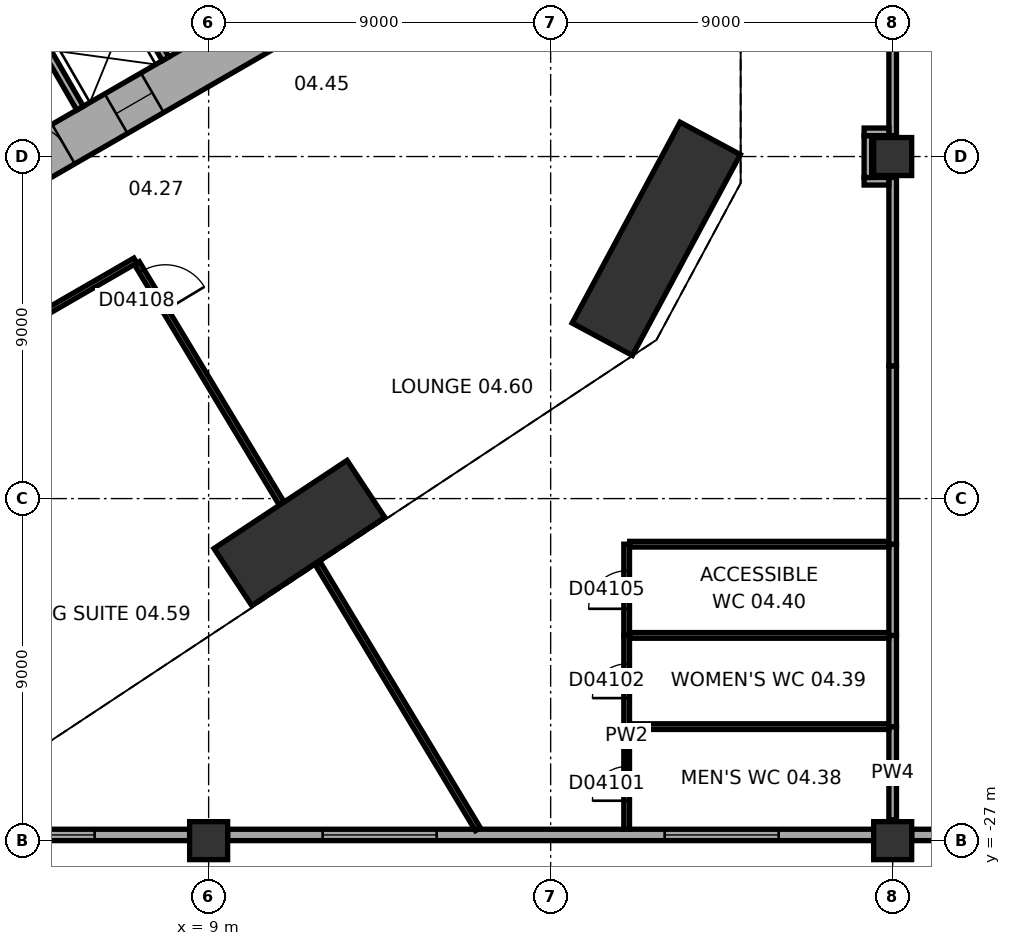
"""IFC4 building model, lengths in metres.
Left out: names, types, materials, properties, quantities, classifications, styles, units other than length and angle.
Written with IfcOpenShell. Run it as: python <this file> out.ifc"""

import sys

from ifc_helpers import new_model, si_unit, direction, frame, frame_2d, origin, origin_2d, place, context, subcontext, project, spatial, rectangle, extrude, element, fill, save


model = new_model("IFC4")
c1 = context("Model", 3, precision=1e-05, world=origin(), true_north=direction((0.0, 1.0)))
c2 = subcontext(c1, "Body", "Model", "MODEL_VIEW")
j1 = project(units=[si_unit("LENGTHUNIT", "METRE"), si_unit("PLANEANGLEUNIT", "RADIAN")], contexts=[c1])
p1 = place(None, origin())
s1 = spatial("IfcSite", under=j1, at=p1, CompositionType="ELEMENT")
p2 = place(p1, origin())
s2 = spatial("IfcBuilding", under=s1, at=p2, CompositionType="ELEMENT")
p3 = place(p2, frame((0.0, 0.0, 29.0)))
s3 = spatial("IfcBuildingStorey", under=s2, at=p3, CompositionType="ELEMENT", Elevation=29.0)
p4 = place(p3, frame((11.389, -18.905, 0.0), z_axis=(0.0, 0.0, 1.0), x_axis=(0.833880042151, 0.551945717714, 0.0)))
e1 = element("IfcColumn", 1, at=p4, inside=s3, PredefinedType="COLUMN", context=c2, shape_type="SweptSolid", body=[
    extrude(rectangle(XDim=4.2, YDim=1.8, at=origin_2d()), origin(), (0.0, 0.0, 1.0), 5.5),
])
p5 = place(p3, frame((20.779, -11.165, 0.0), z_axis=(0.0, 0.0, 1.0), x_axis=(0.473322742071, 0.880889086003, 0.0)))
e2 = element("IfcColumn", 2, at=p5, inside=s3, PredefinedType="COLUMN", context=c2, shape_type="SweptSolid", body=[
    extrude(rectangle(XDim=6.0, YDim=1.8, at=origin_2d()), origin(), (0.0, 0.0, 1.0), 5.5),
])
for number, where, z_axis, x_axis in (
    (3, (9.0, -27.0, 0.0), (0.0, 0.0, 1.0), (1.0, 0.0, 0.0)),
    (4, (27.0, -27.0, 0.0), (0.0, 0.0, 1.0), (1.0, 0.0, 0.0)),
    (5, (27.0, -9.0, 0.0), (0.0, 0.0, 1.0), (1.0, 0.0, 0.0)),
):
    element("IfcColumn", number, at=place(p3, frame(where, z_axis=z_axis, x_axis=x_axis)), inside=s3, PredefinedType="COLUMN", context=c2, shape_type="SweptSolid", body=[
        extrude(rectangle(XDim=1.0, YDim=1.0, at=origin_2d()), origin(), (0.0, 0.0, 1.0), 5.5),
    ])
p6 = place(p3, frame((-0.3, -11.836, 0.0), z_axis=(0.0, 0.0, 1.0), x_axis=(0.866021384402, 0.500006961711, 0.0)))
e6 = element("IfcWall", 6, at=p6, inside=s3, PredefinedType="SHEAR", context=c2, shape_type="SweptSolid", body=[
    extrude(rectangle(XDim=12.355, YDim=1.2, at=frame_2d((6.178, 0.0))), origin(), (0.0, 0.0, 1.0), 5.5),
])
p7 = place(p6, frame((2.828, 0.0, 0.0)))
e7 = element("IfcOpeningElement", 7, at=p7, cuts=e6, PredefinedType="OPENING", context=c2, shape_type="SweptSolid", body=[
    extrude(rectangle(XDim=0.9, YDim=2.1, at=frame_2d((0.45, 1.05))), frame((0.0, 0.61, 0.0), z_axis=(0.0, -1.0, 0.0), x_axis=(1.0, 0.0, 0.0)), (0.0, 0.0, 1.0), 1.22),
])
p8 = place(p6, frame((5.428, 0.0, 0.0)))
e8 = element("IfcOpeningElement", 8, at=p8, cuts=e6, PredefinedType="OPENING", context=c2, shape_type="SweptSolid", body=[
    extrude(rectangle(XDim=0.9, YDim=2.1, at=frame_2d((0.45, 1.05))), frame((0.0, 0.61, 0.0), z_axis=(0.0, -1.0, 0.0), x_axis=(1.0, 0.0, 0.0)), (0.0, 0.0, 1.0), 1.22),
])
p9 = place(p6, frame((7.928, 0.0, 0.0)))
e9 = element("IfcOpeningElement", 9, at=p9, cuts=e6, PredefinedType="OPENING", context=c2, shape_type="SweptSolid", body=[
    extrude(rectangle(XDim=1.1, YDim=2.1, at=frame_2d((0.55, 1.05))), frame((0.0, 0.61, 0.0), z_axis=(0.0, -1.0, 0.0), x_axis=(1.0, 0.0, 0.0)), (0.0, 0.0, 1.0), 1.22),
])
p10 = place(p3, frame((-8.5, -26.85, 0.0), z_axis=(0.0, 0.0, 1.0), x_axis=(1.0, 0.0, 0.0)))
e10 = element("IfcWall", 10, at=p10, inside=s3, PredefinedType="STANDARD", context=c2, shape_type="SweptSolid", body=[
    extrude(rectangle(XDim=17.0, YDim=0.3, at=frame_2d((8.5, 0.0))), origin(), (0.0, 0.0, 1.0), 3.95),
])
p11 = place(p10, frame((2.5, 0.0, 1.0)))
e11 = element("IfcOpeningElement", 11, at=p11, cuts=e10, PredefinedType="OPENING", context=c2, shape_type="SweptSolid", body=[
    extrude(rectangle(XDim=3.0, YDim=2.6, at=frame_2d((1.5, 1.3))), frame((0.0, 0.16, 0.0), z_axis=(0.0, -1.0, 0.0), x_axis=(1.0, 0.0, 0.0)), (0.0, 0.0, 1.0), 0.32),
])
p12 = place(p10, frame((11.5, 0.0, 1.0)))
e12 = element("IfcOpeningElement", 12, at=p12, cuts=e10, PredefinedType="OPENING", context=c2, shape_type="SweptSolid", body=[
    extrude(rectangle(XDim=3.0, YDim=2.6, at=frame_2d((1.5, 1.3))), frame((0.0, 0.16, 0.0), z_axis=(0.0, -1.0, 0.0), x_axis=(1.0, 0.0, 0.0)), (0.0, 0.0, 1.0), 0.32),
])
p13 = place(p3, frame((9.5, -26.85, 0.0), z_axis=(0.0, 0.0, 1.0), x_axis=(1.0, 0.0, 0.0)))
e13 = element("IfcWall", 13, at=p13, inside=s3, PredefinedType="STANDARD", context=c2, shape_type="SweptSolid", body=[
    extrude(rectangle(XDim=17.0, YDim=0.3, at=frame_2d((8.5, 0.0))), origin(), (0.0, 0.0, 1.0), 3.95),
])
p14 = place(p13, frame((2.5, 0.0, 1.0)))
e14 = element("IfcOpeningElement", 14, at=p14, cuts=e13, PredefinedType="OPENING", context=c2, shape_type="SweptSolid", body=[
    extrude(rectangle(XDim=3.0, YDim=2.6, at=frame_2d((1.5, 1.3))), frame((0.0, 0.16, 0.0), z_axis=(0.0, -1.0, 0.0), x_axis=(1.0, 0.0, 0.0)), (0.0, 0.0, 1.0), 0.32),
])
p15 = place(p13, frame((11.5, 0.0, 1.0)))
e15 = element("IfcOpeningElement", 15, at=p15, cuts=e13, PredefinedType="OPENING", context=c2, shape_type="SweptSolid", body=[
    extrude(rectangle(XDim=3.0, YDim=2.6, at=frame_2d((1.5, 1.3))), frame((0.0, 0.16, 0.0), z_axis=(0.0, -1.0, 0.0), x_axis=(1.0, 0.0, 0.0)), (0.0, 0.0, 1.0), 0.32),
])
p16 = place(p3, frame((27.5, -26.85, 0.0), z_axis=(0.0, 0.0, 1.0), x_axis=(1.0, 0.0, 0.0)))
e16 = element("IfcWall", 16, at=p16, inside=s3, PredefinedType="STANDARD", context=c2, shape_type="SweptSolid", body=[
    extrude(rectangle(XDim=17.0, YDim=0.3, at=frame_2d((8.5, 0.0))), origin(), (0.0, 0.0, 1.0), 3.95),
])
p17 = place(p16, frame((2.5, 0.0, 1.0)))
e17 = element("IfcOpeningElement", 17, at=p17, cuts=e16, PredefinedType="OPENING", context=c2, shape_type="SweptSolid", body=[
    extrude(rectangle(XDim=3.0, YDim=2.6, at=frame_2d((1.5, 1.3))), frame((0.0, 0.16, 0.0), z_axis=(0.0, -1.0, 0.0), x_axis=(1.0, 0.0, 0.0)), (0.0, 0.0, 1.0), 0.32),
])
p18 = place(p16, frame((11.5, 0.0, 1.0)))
e18 = element("IfcOpeningElement", 18, at=p18, cuts=e16, PredefinedType="OPENING", context=c2, shape_type="SweptSolid", body=[
    extrude(rectangle(XDim=3.0, YDim=2.6, at=frame_2d((1.5, 1.3))), frame((0.0, 0.16, 0.0), z_axis=(0.0, -1.0, 0.0), x_axis=(1.0, 0.0, 0.0)), (0.0, 0.0, 1.0), 0.32),
])
p19 = place(p3, frame((-0.024, -8.559, 0.0), z_axis=(0.0, 0.0, 1.0), x_axis=(0.866026010844, 0.49999894854, 0.0)))
e19 = element("IfcWall", 19, at=p19, inside=s3, PredefinedType="PARTITIONING", context=c2, shape_type="SweptSolid", body=[
    extrude(rectangle(XDim=8.0, YDim=0.2, at=frame_2d((4.0, 0.0))), origin(), (0.0, 0.0, 1.0), 5.15),
])
for number, where, z_axis, x_axis in (
    (20, (4.516, -5.822, 0.0), (0.0, 0.0, 1.0), (0.5, -0.866, 0.0)),
    (21, (6.768, -4.522, 0.0), (0.0, 0.0, 1.0), (0.5, -0.866, 0.0)),
):
    element("IfcWall", number, at=place(p3, frame(where, z_axis=z_axis, x_axis=x_axis)), inside=s3, PredefinedType="PARTITIONING", context=c2, shape_type="SweptSolid", body=[
        extrude(rectangle(XDim=2.2, YDim=0.2, at=frame_2d((1.1, 0.0))), origin(), (0.0, 0.0, 1.0), 5.15),
    ])
p20 = place(p3, frame((0.847, -7.767, 0.0), z_axis=(0.0, 0.0, 1.0), x_axis=(0.866027801685, 0.499995846692, 0.0)))
e22 = element("IfcWall", 22, at=p20, inside=s3, PredefinedType="SHEAR", context=c2, shape_type="SweptSolid", body=[
    extrude(rectangle(XDim=7.06, YDim=0.3, at=frame_2d((3.53, 0.0))), origin(), (0.0, 0.0, 1.0), 5.15),
])
p21 = place(p3, frame((20.0, -26.7, 0.0), z_axis=(0.0, 0.0, 1.0), x_axis=(0.0, 1.0, 0.0)))
e23 = element("IfcWall", 23, at=p21, inside=s3, PredefinedType="PARTITIONING", context=c2, shape_type="SweptSolid", body=[
    extrude(rectangle(XDim=2.7, YDim=0.15, at=frame_2d((1.35, 0.0))), origin(), (0.0, 0.0, 1.0), 5.15),
])
p22 = place(p21, frame((0.75, 0.0, 0.0)))
e24 = element("IfcOpeningElement", 24, at=p22, cuts=e23, PredefinedType="OPENING", context=c2, shape_type="SweptSolid", body=[
    extrude(rectangle(XDim=0.9, YDim=2.1, at=frame_2d((0.45, 1.05))), frame((0.0, 0.085, 0.0), z_axis=(0.0, -1.0, 0.0), x_axis=(1.0, 0.0, 0.0)), (0.0, 0.0, 1.0), 0.17),
])
p23 = place(p3, frame((27.0, -26.45, 0.0), z_axis=(0.0, 0.0, 1.0), x_axis=(0.0, 1.0, 0.0)))
e25 = element("IfcWall", 25, at=p23, inside=s3, PredefinedType="PARTITIONING", context=c2, shape_type="SweptSolid", body=[
    extrude(rectangle(XDim=2.45, YDim=0.2, at=frame_2d((1.225, 0.0))), origin(), (0.0, 0.0, 1.0), 3.95),
])
p24 = place(p3, frame((20.0, -24.0, 0.0), z_axis=(0.0, 0.0, 1.0), x_axis=(0.0, 1.0, 0.0)))
e26 = element("IfcWall", 26, at=p24, inside=s3, PredefinedType="PARTITIONING", context=c2, shape_type="SweptSolid", body=[
    extrude(rectangle(XDim=2.4, YDim=0.15, at=frame_2d((1.2, 0.0))), origin(), (0.0, 0.0, 1.0), 5.15),
])
p25 = place(p24, frame((0.75, 0.0, 0.0)))
e27 = element("IfcOpeningElement", 27, at=p25, cuts=e26, PredefinedType="OPENING", context=c2, shape_type="SweptSolid", body=[
    extrude(rectangle(XDim=0.9, YDim=2.1, at=frame_2d((0.45, 1.05))), frame((0.0, 0.085, 0.0), z_axis=(0.0, -1.0, 0.0), x_axis=(1.0, 0.0, 0.0)), (0.0, 0.0, 1.0), 0.17),
])
p26 = place(p3, frame((20.08, -24.0, 0.0), z_axis=(0.0, 0.0, 1.0), x_axis=(1.0, 0.0, 0.0)))
e28 = element("IfcWall", 28, at=p26, inside=s3, PredefinedType="PARTITIONING", context=c2, shape_type="SweptSolid", body=[
    extrude(rectangle(XDim=6.82, YDim=0.15, at=frame_2d((3.41, 0.0))), origin(), (0.0, 0.0, 1.0), 5.15),
])
p27 = place(p3, frame((27.0, -24.0, 0.0), z_axis=(0.0, 0.0, 1.0), x_axis=(0.0, 1.0, 0.0)))
e29 = element("IfcWall", 29, at=p27, inside=s3, PredefinedType="PARTITIONING", context=c2, shape_type="SweptSolid", body=[
    extrude(rectangle(XDim=2.4, YDim=0.2, at=frame_2d((1.2, 0.0))), origin(), (0.0, 0.0, 1.0), 3.95),
])
p28 = place(p3, frame((20.0, -21.6, 0.0), z_axis=(0.0, 0.0, 1.0), x_axis=(0.0, 1.0, 0.0)))
e30 = element("IfcWall", 30, at=p28, inside=s3, PredefinedType="PARTITIONING", context=c2, shape_type="SweptSolid", body=[
    extrude(rectangle(XDim=2.4, YDim=0.15, at=frame_2d((1.2, 0.0))), origin(), (0.0, 0.0, 1.0), 5.15),
])
p29 = place(p28, frame((0.7, 0.0, 0.0)))
e31 = element("IfcOpeningElement", 31, at=p29, cuts=e30, PredefinedType="OPENING", context=c2, shape_type="SweptSolid", body=[
    extrude(rectangle(XDim=1.0, YDim=2.1, at=frame_2d((0.5, 1.05))), frame((0.0, 0.085, 0.0), z_axis=(0.0, -1.0, 0.0), x_axis=(1.0, 0.0, 0.0)), (0.0, 0.0, 1.0), 0.17),
])
p30 = place(p3, frame((20.08, -21.6, 0.0), z_axis=(0.0, 0.0, 1.0), x_axis=(1.0, 0.0, 0.0)))
e32 = element("IfcWall", 32, at=p30, inside=s3, PredefinedType="PARTITIONING", context=c2, shape_type="SweptSolid", body=[
    extrude(rectangle(XDim=6.82, YDim=0.15, at=frame_2d((3.41, 0.0))), origin(), (0.0, 0.0, 1.0), 5.15),
])
p31 = place(p3, frame((27.0, -21.6, 0.0), z_axis=(0.0, 0.0, 1.0), x_axis=(0.0, 1.0, 0.0)))
e33 = element("IfcWall", 33, at=p31, inside=s3, PredefinedType="PARTITIONING", context=c2, shape_type="SweptSolid", body=[
    extrude(rectangle(XDim=2.4, YDim=0.2, at=frame_2d((1.2, 0.0))), origin(), (0.0, 0.0, 1.0), 3.95),
])
p32 = place(p3, frame((11.879, -19.719, 0.0), z_axis=(0.0, 0.0, 1.0), x_axis=(0.516054476578, -0.856555764212, 0.0)))
e34 = element("IfcWall", 34, at=p32, inside=s3, PredefinedType="PARTITIONING", context=c2, shape_type="SweptSolid", body=[
    extrude(rectangle(XDim=8.149, YDim=0.15, at=frame_2d((4.075, 0.0))), origin(), (0.0, 0.0, 1.0), 5.15),
])
p33 = place(p3, frame((20.08, -19.2, 0.0), z_axis=(0.0, 0.0, 1.0), x_axis=(1.0, 0.0, 0.0)))
e35 = element("IfcWall", 35, at=p33, inside=s3, PredefinedType="PARTITIONING", context=c2, shape_type="SweptSolid", body=[
    extrude(rectangle(XDim=6.82, YDim=0.15, at=frame_2d((3.41, 0.0))), origin(), (0.0, 0.0, 1.0), 5.15),
])
p34 = place(p3, frame((27.0, -19.2, 0.0), z_axis=(0.0, 0.0, 1.0), x_axis=(0.0, 1.0, 0.0)))
e36 = element("IfcWall", 36, at=p34, inside=s3, PredefinedType="PARTITIONING", context=c2, shape_type="SweptSolid", body=[
    extrude(rectangle(XDim=4.692, YDim=0.2, at=frame_2d((2.346, 0.0))), origin(), (0.0, 0.0, 1.0), 3.95),
])
p35 = place(p3, frame((10.924, -18.133, 0.0), z_axis=(0.0, 0.0, 1.0), x_axis=(-0.516035715917, 0.856567066784, 0.0)))
e37 = element("IfcWall", 37, at=p35, inside=s3, PredefinedType="PARTITIONING", context=c2, shape_type="SweptSolid", body=[
    extrude(rectangle(XDim=7.387, YDim=0.15, at=frame_2d((3.693, 0.0))), origin(), (0.0, 0.0, 1.0), 5.15),
])
p36 = place(p35, frame((5.937, 0.0, 0.0)))
e38 = element("IfcOpeningElement", 38, at=p36, cuts=e37, PredefinedType="OPENING", context=c2, shape_type="SweptSolid", body=[
    extrude(rectangle(XDim=1.2, YDim=2.1, at=frame_2d((0.6, 1.05))), frame((0.0, 0.085, 0.0), z_axis=(0.0, -1.0, 0.0), x_axis=(1.0, 0.0, 0.0)), (0.0, 0.0, 1.0), 0.17),
])
p37 = place(p3, frame((0.475, -15.545, 0.0), z_axis=(0.0, 0.0, 1.0), x_axis=(0.866021168401, 0.500007335828, 0.0)))
e39 = element("IfcWall", 39, at=p37, inside=s3, PredefinedType="PARTITIONING", context=c2, shape_type="SweptSolid", body=[
    extrude(rectangle(XDim=7.616, YDim=0.15, at=frame_2d((3.808, 0.0))), origin(), (0.0, 0.0, 1.0), 5.15),
])
p38 = place(p3, frame((27.0, -14.508, 0.0), z_axis=(0.0, 0.0, 1.0), x_axis=(0.0, 1.0, 0.0)))
e40 = element("IfcWall", 40, at=p38, inside=s3, PredefinedType="PARTITIONING", context=c2, shape_type="SweptSolid", body=[
    extrude(rectangle(XDim=4.958, YDim=0.2, at=frame_2d((2.479, 0.0))), origin(), (0.0, 0.0, 1.0), 3.95),
])
p39 = place(p3, frame((26.9, -9.65, 0.0), z_axis=(0.0, 0.0, 1.0), x_axis=(-1.0, 0.0, 0.0)))
e41 = element("IfcWall", 41, at=p39, inside=s3, PredefinedType="PARTITIONING", context=c2, shape_type="SweptSolid", body=[
    extrude(rectangle(XDim=0.652, YDim=0.2, at=frame_2d((0.326, 0.0))), origin(), (0.0, 0.0, 1.0), 5.15),
])
p40 = place(p3, frame((26.348, -9.55, 0.0), z_axis=(0.0, 0.0, 1.0), x_axis=(0.0, 1.0, 0.0)))
e42 = element("IfcWall", 42, at=p40, inside=s3, PredefinedType="PARTITIONING", context=c2, shape_type="SweptSolid", body=[
    extrude(rectangle(XDim=1.1, YDim=0.2, at=frame_2d((0.55, 0.0))), origin(), (0.0, 0.0, 1.0), 5.15),
])
p41 = place(p3, frame((27.0, -8.45, 0.0), z_axis=(0.0, 0.0, 1.0), x_axis=(0.0, 1.0, 0.0)))
e43 = element("IfcWall", 43, at=p41, inside=s3, PredefinedType="PARTITIONING", context=c2, shape_type="SweptSolid", body=[
    extrude(rectangle(XDim=3.05, YDim=0.2, at=frame_2d((1.525, 0.0))), origin(), (0.0, 0.0, 1.0), 3.95),
])
p42 = place(p3, frame((26.9, -8.35, 0.0), z_axis=(0.0, 0.0, 1.0), x_axis=(-1.0, 0.0, 0.0)))
e44 = element("IfcWall", 44, at=p42, inside=s3, PredefinedType="PARTITIONING", context=c2, shape_type="SweptSolid", body=[
    extrude(rectangle(XDim=0.652, YDim=0.2, at=frame_2d((0.326, 0.0))), origin(), (0.0, 0.0, 1.0), 5.15),
])
p43 = place(p12, origin())
e45 = element("IfcWindow", 45, at=p43, inside=s3, PartitioningType="SINGLE_PANEL", PredefinedType="WINDOW", context=c2, shape_type="SweptSolid", body=[
    extrude(rectangle(XDim=3.0, YDim=2.6, at=frame_2d((1.5, 1.3))), frame((0.0, 0.03, 0.0), z_axis=(0.0, -1.0, 0.0), x_axis=(1.0, 0.0, 0.0)), (0.0, 0.0, 1.0), 0.06),
])
fill(e12, e45)
p44 = place(p14, origin())
e46 = element("IfcWindow", 46, at=p44, inside=s3, PartitioningType="SINGLE_PANEL", PredefinedType="WINDOW", context=c2, shape_type="SweptSolid", body=[
    extrude(rectangle(XDim=3.0, YDim=2.6, at=frame_2d((1.5, 1.3))), frame((0.0, 0.03, 0.0), z_axis=(0.0, -1.0, 0.0), x_axis=(1.0, 0.0, 0.0)), (0.0, 0.0, 1.0), 0.06),
])
fill(e14, e46)
p45 = place(p15, origin())
e47 = element("IfcWindow", 47, at=p45, inside=s3, PartitioningType="SINGLE_PANEL", PredefinedType="WINDOW", context=c2, shape_type="SweptSolid", body=[
    extrude(rectangle(XDim=3.0, YDim=2.6, at=frame_2d((1.5, 1.3))), frame((0.0, 0.03, 0.0), z_axis=(0.0, -1.0, 0.0), x_axis=(1.0, 0.0, 0.0)), (0.0, 0.0, 1.0), 0.06),
])
fill(e15, e47)
p46 = place(p8, origin())
e48 = element("IfcDoor", 48, at=p46, inside=s3, OperationType="SINGLE_SWING_LEFT", PredefinedType="DOOR", context=c2, shape_type="SweptSolid", body=[
    extrude(rectangle(XDim=0.9, YDim=2.1, at=frame_2d((0.45, 1.05))), frame((0.0, 0.025, 0.0), z_axis=(0.0, -1.0, 0.0), x_axis=(1.0, 0.0, 0.0)), (0.0, 0.0, 1.0), 0.05),
])
fill(e8, e48)
p47 = place(p9, origin())
e49 = element("IfcDoor", 49, at=p47, inside=s3, OperationType="DOUBLE_DOOR_SLIDING", PredefinedType="DOOR", context=c2, shape_type="SweptSolid", body=[
    extrude(rectangle(XDim=1.1, YDim=2.1, at=frame_2d((0.55, 1.05))), frame((0.0, 0.025, 0.0), z_axis=(0.0, -1.0, 0.0), x_axis=(1.0, 0.0, 0.0)), (0.0, 0.0, 1.0), 0.05),
])
fill(e9, e49)
p48 = place(p22, origin())
e50 = element("IfcDoor", 50, at=p48, inside=s3, OperationType="SINGLE_SWING_LEFT", PredefinedType="DOOR", context=c2, shape_type="SweptSolid", body=[
    extrude(rectangle(XDim=0.9, YDim=2.1, at=frame_2d((0.45, 1.05))), frame((0.0, 0.025, 0.0), z_axis=(0.0, -1.0, 0.0), x_axis=(1.0, 0.0, 0.0)), (0.0, 0.0, 1.0), 0.05),
])
fill(e24, e50)
p49 = place(p25, origin())
e51 = element("IfcDoor", 51, at=p49, inside=s3, OperationType="SINGLE_SWING_LEFT", PredefinedType="DOOR", context=c2, shape_type="SweptSolid", body=[
    extrude(rectangle(XDim=0.9, YDim=2.1, at=frame_2d((0.45, 1.05))), frame((0.0, 0.025, 0.0), z_axis=(0.0, -1.0, 0.0), x_axis=(1.0, 0.0, 0.0)), (0.0, 0.0, 1.0), 0.05),
])
fill(e27, e51)
p50 = place(p29, origin())
e52 = element("IfcDoor", 52, at=p50, inside=s3, OperationType="SINGLE_SWING_LEFT", PredefinedType="DOOR", context=c2, shape_type="SweptSolid", body=[
    extrude(rectangle(XDim=1.0, YDim=2.1, at=frame_2d((0.5, 1.05))), frame((0.0, 0.025, 0.0), z_axis=(0.0, -1.0, 0.0), x_axis=(1.0, 0.0, 0.0)), (0.0, 0.0, 1.0), 0.05),
])
fill(e31, e52)
p51 = place(p36, origin())
e53 = element("IfcDoor", 53, at=p51, inside=s3, OperationType="SINGLE_SWING_LEFT", PredefinedType="DOOR", context=c2, shape_type="SweptSolid", body=[
    extrude(rectangle(XDim=1.2, YDim=2.1, at=frame_2d((0.6, 1.05))), frame((0.0, 0.025, 0.0), z_axis=(0.0, -1.0, 0.0), x_axis=(1.0, 0.0, 0.0)), (0.0, 0.0, 1.0), 0.05),
])
fill(e38, e53)
save(model, sys.argv[1])
